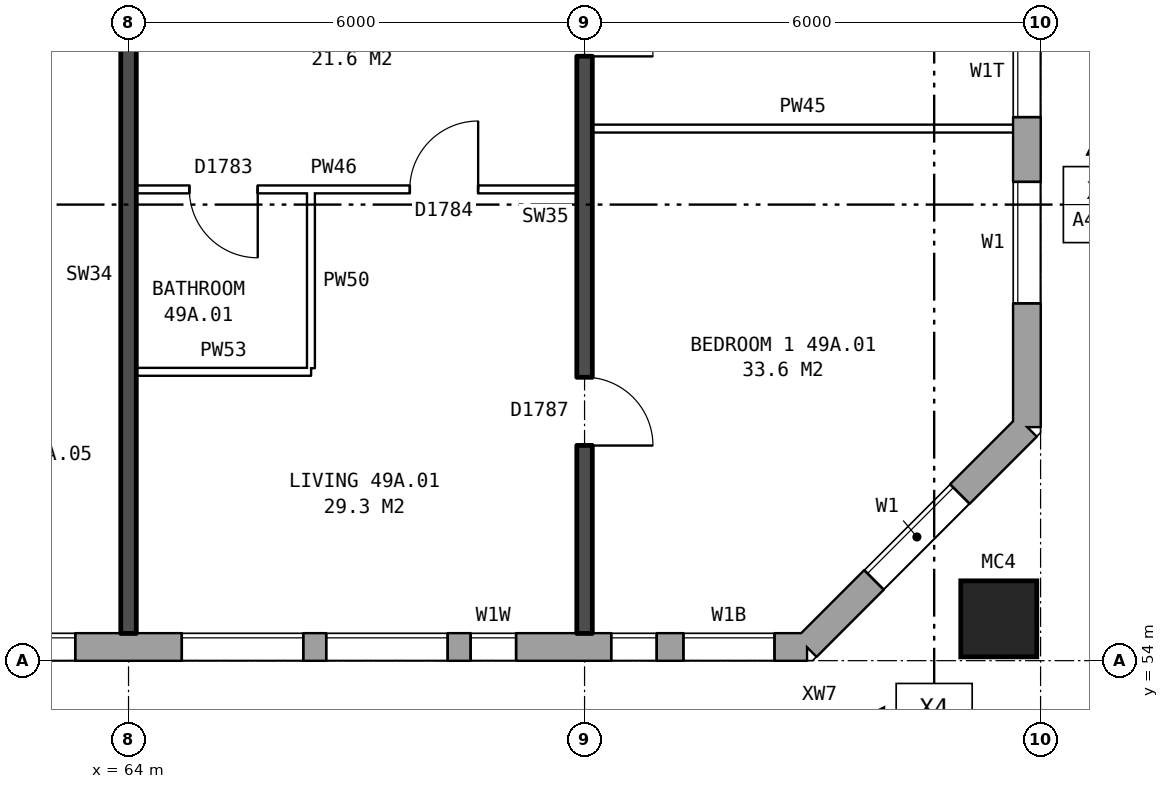
"""IFC4 building model, lengths in metres.
Left out: names, types, materials, properties, quantities, classifications, styles, units other than length and angle.
Written with IfcOpenShell. Run it as: python <this file> out.ifc"""

import sys

from ifc_helpers import new_model, si_unit, direction, frame, frame_2d, origin, origin_2d, place, context, subcontext, project, spatial, rectangle, hollow_rectangle, extrude, element, fill, save


model = new_model("IFC4")
c1 = context("Model", 3, precision=1e-05, world=origin(), true_north=direction((0.0, 1.0)))
c2 = subcontext(c1, "Body", "Model", "MODEL_VIEW")
j1 = project(units=[si_unit("LENGTHUNIT", "METRE"), si_unit("PLANEANGLEUNIT", "RADIAN")], contexts=[c1])
p1 = place(None, origin())
s1 = spatial("IfcSite", under=j1, at=p1, CompositionType="ELEMENT")
p2 = place(p1, origin())
s2 = spatial("IfcBuilding", under=s1, at=p2, CompositionType="ELEMENT")
p3 = place(p2, frame((0.0, 0.0, 175.8)))
s3 = spatial("IfcBuildingStorey", under=s2, at=p3, CompositionType="ELEMENT", Elevation=175.8)
p4 = place(p3, frame((75.45, 54.55, 0.0), z_axis=(0.0, 0.0, 1.0), x_axis=(1.0, 0.0, 0.0)))
e1 = element("IfcColumn", 1, at=p4, inside=s3, PredefinedType="COLUMN", context=c2, shape_type="SweptSolid", body=[
    extrude(hollow_rectangle(XDim=1.0, YDim=1.0, WallThickness=0.055, at=origin_2d()), origin(), (0.0, 0.0, 1.0), 3.1),
])
p5 = place(p3, frame((33.325, 54.18, 0.0), z_axis=(0.0, 0.0, 1.0), x_axis=(1.0, 0.0, 0.0)))
e2 = element("IfcWall", 2, at=p5, inside=s3, PredefinedType="STANDARD", context=c2, shape_type="SweptSolid", body=[
    extrude(rectangle(XDim=39.601, YDim=0.36, at=frame_2d((19.8, 0.0))), origin(), (0.0, 0.0, 1.0), 2.85),
])
p6 = place(p5, frame((0.875, 0.0, 0.8)))
e3 = element("IfcOpeningElement", 3, at=p6, cuts=e2, PredefinedType="OPENING", context=c2, shape_type="SweptSolid", body=[
    extrude(rectangle(XDim=0.6, YDim=1.8, at=frame_2d((0.3, 0.9))), frame((0.0, 0.19, 0.0), z_axis=(0.0, -1.0, 0.0), x_axis=(1.0, 0.0, 0.0)), (0.0, 0.0, 1.0), 0.38),
])
p7 = place(p5, frame((4.375, 0.0, 0.8)))
e4 = element("IfcOpeningElement", 4, at=p7, cuts=e2, PredefinedType="OPENING", context=c2, shape_type="SweptSolid", body=[
    extrude(rectangle(XDim=1.6, YDim=1.8, at=frame_2d((0.8, 0.9))), frame((0.0, 0.19, 0.0), z_axis=(0.0, -1.0, 0.0), x_axis=(1.0, 0.0, 0.0)), (0.0, 0.0, 1.0), 0.38),
])
p8 = place(p5, frame((7.375, 0.0, 0.8)))
e5 = element("IfcOpeningElement", 5, at=p8, cuts=e2, PredefinedType="OPENING", context=c2, shape_type="SweptSolid", body=[
    extrude(rectangle(XDim=1.6, YDim=1.8, at=frame_2d((0.8, 0.9))), frame((0.0, 0.19, 0.0), z_axis=(0.0, -1.0, 0.0), x_axis=(1.0, 0.0, 0.0)), (0.0, 0.0, 1.0), 0.38),
])
p9 = place(p5, frame((10.375, 0.0, 0.8)))
e6 = element("IfcOpeningElement", 6, at=p9, cuts=e2, PredefinedType="OPENING", context=c2, shape_type="SweptSolid", body=[
    extrude(rectangle(XDim=1.6, YDim=1.8, at=frame_2d((0.8, 0.9))), frame((0.0, 0.19, 0.0), z_axis=(0.0, -1.0, 0.0), x_axis=(1.0, 0.0, 0.0)), (0.0, 0.0, 1.0), 0.38),
])
p10 = place(p5, frame((13.375, 0.0, 0.8)))
e7 = element("IfcOpeningElement", 7, at=p10, cuts=e2, PredefinedType="OPENING", context=c2, shape_type="SweptSolid", body=[
    extrude(rectangle(XDim=1.6, YDim=1.8, at=frame_2d((0.8, 0.9))), frame((0.0, 0.19, 0.0), z_axis=(0.0, -1.0, 0.0), x_axis=(1.0, 0.0, 0.0)), (0.0, 0.0, 1.0), 0.38),
])
p11 = place(p5, frame((16.375, 0.0, 0.8)))
e8 = element("IfcOpeningElement", 8, at=p11, cuts=e2, PredefinedType="OPENING", context=c2, shape_type="SweptSolid", body=[
    extrude(rectangle(XDim=1.6, YDim=1.8, at=frame_2d((0.8, 0.9))), frame((0.0, 0.19, 0.0), z_axis=(0.0, -1.0, 0.0), x_axis=(1.0, 0.0, 0.0)), (0.0, 0.0, 1.0), 0.38),
])
p12 = place(p5, frame((19.375, 0.0, 0.8)))
e9 = element("IfcOpeningElement", 9, at=p12, cuts=e2, PredefinedType="OPENING", context=c2, shape_type="SweptSolid", body=[
    extrude(rectangle(XDim=1.6, YDim=1.8, at=frame_2d((0.8, 0.9))), frame((0.0, 0.19, 0.0), z_axis=(0.0, -1.0, 0.0), x_axis=(1.0, 0.0, 0.0)), (0.0, 0.0, 1.0), 0.38),
])
p13 = place(p5, frame((22.375, 0.0, 0.8)))
e10 = element("IfcOpeningElement", 10, at=p13, cuts=e2, PredefinedType="OPENING", context=c2, shape_type="SweptSolid", body=[
    extrude(rectangle(XDim=1.6, YDim=1.8, at=frame_2d((0.8, 0.9))), frame((0.0, 0.19, 0.0), z_axis=(0.0, -1.0, 0.0), x_axis=(1.0, 0.0, 0.0)), (0.0, 0.0, 1.0), 0.38),
])
p14 = place(p5, frame((25.375, 0.0, 0.8)))
e11 = element("IfcOpeningElement", 11, at=p14, cuts=e2, PredefinedType="OPENING", context=c2, shape_type="SweptSolid", body=[
    extrude(rectangle(XDim=1.6, YDim=1.8, at=frame_2d((0.8, 0.9))), frame((0.0, 0.19, 0.0), z_axis=(0.0, -1.0, 0.0), x_axis=(1.0, 0.0, 0.0)), (0.0, 0.0, 1.0), 0.38),
])
p15 = place(p5, frame((28.375, 0.0, 0.8)))
e12 = element("IfcOpeningElement", 12, at=p15, cuts=e2, PredefinedType="OPENING", context=c2, shape_type="SweptSolid", body=[
    extrude(rectangle(XDim=1.6, YDim=1.8, at=frame_2d((0.8, 0.9))), frame((0.0, 0.19, 0.0), z_axis=(0.0, -1.0, 0.0), x_axis=(1.0, 0.0, 0.0)), (0.0, 0.0, 1.0), 0.38),
])
p16 = place(p5, frame((31.375, 0.0, 0.8)))
e13 = element("IfcOpeningElement", 13, at=p16, cuts=e2, PredefinedType="OPENING", context=c2, shape_type="SweptSolid", body=[
    extrude(rectangle(XDim=1.6, YDim=1.8, at=frame_2d((0.8, 0.9))), frame((0.0, 0.19, 0.0), z_axis=(0.0, -1.0, 0.0), x_axis=(1.0, 0.0, 0.0)), (0.0, 0.0, 1.0), 0.38),
])
p17 = place(p5, frame((33.275, 0.0, 0.8)))
e14 = element("IfcOpeningElement", 14, at=p17, cuts=e2, PredefinedType="OPENING", context=c2, shape_type="SweptSolid", body=[
    extrude(rectangle(XDim=1.6, YDim=1.8, at=frame_2d((0.8, 0.9))), frame((0.0, 0.19, 0.0), z_axis=(0.0, -1.0, 0.0), x_axis=(1.0, 0.0, 0.0)), (0.0, 0.0, 1.0), 0.38),
])
p18 = place(p5, frame((37.025, 0.0, 1.7)))
e15 = element("IfcOpeningElement", 15, at=p18, cuts=e2, PredefinedType="OPENING", context=c2, shape_type="SweptSolid", body=[
    extrude(rectangle(XDim=0.6, YDim=0.9, at=frame_2d((0.3, 0.45))), frame((0.0, 0.19, 0.0), z_axis=(0.0, -1.0, 0.0), x_axis=(1.0, 0.0, 0.0)), (0.0, 0.0, 1.0), 0.38),
])
p19 = place(p5, frame((1.775, 0.0, 1.7)))
e16 = element("IfcOpeningElement", 16, at=p19, cuts=e2, PredefinedType="OPENING", context=c2, shape_type="SweptSolid", body=[
    extrude(rectangle(XDim=0.8, YDim=0.9, at=frame_2d((0.4, 0.45))), frame((0.0, 0.19, 0.0), z_axis=(0.0, -1.0, 0.0), x_axis=(1.0, 0.0, 0.0)), (0.0, 0.0, 1.0), 0.38),
])
p20 = place(p5, frame((35.175, 0.0, 0.8)))
e17 = element("IfcOpeningElement", 17, at=p20, cuts=e2, PredefinedType="OPENING", context=c2, shape_type="SweptSolid", body=[
    extrude(rectangle(XDim=0.6, YDim=0.9, at=frame_2d((0.3, 0.45))), frame((0.0, 0.19, 0.0), z_axis=(0.0, -1.0, 0.0), x_axis=(1.0, 0.0, 0.0)), (0.0, 0.0, 1.0), 0.38),
])
p21 = place(p5, frame((37.975, 0.0, 0.8)))
e18 = element("IfcOpeningElement", 18, at=p21, cuts=e2, PredefinedType="OPENING", context=c2, shape_type="SweptSolid", body=[
    extrude(rectangle(XDim=1.2, YDim=1.8, at=frame_2d((0.6, 0.9))), frame((0.0, 0.19, 0.0), z_axis=(0.0, -1.0, 0.0), x_axis=(1.0, 0.0, 0.0)), (0.0, 0.0, 1.0), 0.38),
])
p22 = place(p3, frame((72.925, 54.18, 0.0), z_axis=(0.0, 0.0, 1.0), x_axis=(0.707106781187, 0.707106781187, 0.0)))
e19 = element("IfcWall", 19, at=p22, inside=s3, PredefinedType="STANDARD", context=c2, shape_type="SweptSolid", body=[
    extrude(rectangle(XDim=4.094, YDim=0.36, at=frame_2d((2.047, 0.0))), origin(), (0.0, 0.0, 1.0), 2.85),
])
p23 = place(p22, frame((1.247, 0.0, 0.8)))
e20 = element("IfcOpeningElement", 20, at=p23, cuts=e19, PredefinedType="OPENING", context=c2, shape_type="SweptSolid", body=[
    extrude(rectangle(XDim=1.6, YDim=1.8, at=frame_2d((0.8, 0.9))), frame((0.0, 0.19, 0.0), z_axis=(0.0, -1.0, 0.0), x_axis=(1.0, 0.0, 0.0)), (0.0, 0.0, 1.0), 0.38),
])
p24 = place(p3, frame((75.82, 57.075, 0.0), z_axis=(0.0, 0.0, 1.0), x_axis=(0.0, 1.0, 0.0)))
e21 = element("IfcWall", 21, at=p24, inside=s3, PredefinedType="STANDARD", context=c2, shape_type="SweptSolid", body=[
    extrude(rectangle(XDim=25.851, YDim=0.36, at=frame_2d((12.925, 0.0))), origin(), (0.0, 0.0, 1.0), 2.85),
])
p25 = place(p24, frame((1.625, 0.0, 0.8)))
e22 = element("IfcOpeningElement", 22, at=p25, cuts=e21, PredefinedType="OPENING", context=c2, shape_type="SweptSolid", body=[
    extrude(rectangle(XDim=1.6, YDim=1.8, at=frame_2d((0.8, 0.9))), frame((0.0, 0.19, 0.0), z_axis=(0.0, -1.0, 0.0), x_axis=(1.0, 0.0, 0.0)), (0.0, 0.0, 1.0), 0.38),
])
p26 = place(p24, frame((4.075, 0.0, 1.65)))
e23 = element("IfcOpeningElement", 23, at=p26, cuts=e21, PredefinedType="OPENING", context=c2, shape_type="SweptSolid", body=[
    extrude(rectangle(XDim=1.2, YDim=0.9, at=frame_2d((0.6, 0.45))), frame((0.0, 0.19, 0.0), z_axis=(0.0, -1.0, 0.0), x_axis=(1.0, 0.0, 0.0)), (0.0, 0.0, 1.0), 0.38),
])
p27 = place(p24, frame((19.45, 0.0, 0.35)))
e24 = element("IfcOpeningElement", 24, at=p27, cuts=e21, PredefinedType="OPENING", context=c2, shape_type="SweptSolid", body=[
    extrude(rectangle(XDim=0.8, YDim=0.9, at=frame_2d((0.4, 0.45))), frame((0.0, 0.19, 0.0), z_axis=(0.0, -1.0, 0.0), x_axis=(1.0, 0.0, 0.0)), (0.0, 0.0, 1.0), 0.38),
])
p28 = place(p24, frame((22.625, 0.0, 0.8)))
e25 = element("IfcOpeningElement", 25, at=p28, cuts=e21, PredefinedType="OPENING", context=c2, shape_type="SweptSolid", body=[
    extrude(rectangle(XDim=1.6, YDim=1.8, at=frame_2d((0.8, 0.9))), frame((0.0, 0.19, 0.0), z_axis=(0.0, -1.0, 0.0), x_axis=(1.0, 0.0, 0.0)), (0.0, 0.0, 1.0), 0.38),
])
p29 = place(p24, frame((5.775, 0.0, 0.45)))
e26 = element("IfcOpeningElement", 26, at=p29, cuts=e21, PredefinedType="OPENING", context=c2, shape_type="SweptSolid", body=[
    extrude(rectangle(XDim=0.6, YDim=0.9, at=frame_2d((0.3, 0.45))), frame((0.0, 0.19, 0.0), z_axis=(0.0, -1.0, 0.0), x_axis=(1.0, 0.0, 0.0)), (0.0, 0.0, 1.0), 0.38),
])
p30 = place(p24, frame((20.6, 0.0, 1.65)))
e27 = element("IfcOpeningElement", 27, at=p30, cuts=e21, PredefinedType="OPENING", context=c2, shape_type="SweptSolid", body=[
    extrude(rectangle(XDim=1.0, YDim=0.9, at=frame_2d((0.5, 0.45))), frame((0.0, 0.19, 0.0), z_axis=(0.0, -1.0, 0.0), x_axis=(1.0, 0.0, 0.0)), (0.0, 0.0, 1.0), 0.38),
])
p31 = place(p3, frame((64.1, 57.8, 0.0), z_axis=(0.0, 0.0, 1.0), x_axis=(1.0, 0.0, 0.0)))
e28 = element("IfcWall", 28, at=p31, inside=s3, PredefinedType="PARTITIONING", context=c2, shape_type="SweptSolid", body=[
    extrude(rectangle(XDim=2.3, YDim=0.1, at=frame_2d((1.15, 0.0))), origin(), (0.0, 0.0, 1.0), 2.85),
])
p32 = place(p3, frame((64.1, 60.2, 0.0), z_axis=(0.0, 0.0, 1.0), x_axis=(1.0, 0.0, 0.0)))
e29 = element("IfcWall", 29, at=p32, inside=s3, PredefinedType="PARTITIONING", context=c2, shape_type="SweptSolid", body=[
    extrude(rectangle(XDim=5.8, YDim=0.1, at=frame_2d((2.9, 0.0))), origin(), (0.0, 0.0, 1.0), 2.85),
])
p33 = place(p32, frame((3.6, 0.0, 0.0)))
e30 = element("IfcOpeningElement", 30, at=p33, cuts=e29, PredefinedType="OPENING", context=c2, shape_type="SweptSolid", body=[
    extrude(rectangle(XDim=0.9, YDim=2.1, at=frame_2d((0.45, 1.05))), frame((0.0, 0.06, 0.0), z_axis=(0.0, -1.0, 0.0), x_axis=(1.0, 0.0, 0.0)), (0.0, 0.0, 1.0), 0.12),
])
p34 = place(p32, frame((0.7, 0.0, 0.0)))
e31 = element("IfcOpeningElement", 31, at=p34, cuts=e29, PredefinedType="OPENING", context=c2, shape_type="SweptSolid", body=[
    extrude(rectangle(XDim=0.9, YDim=2.1, at=frame_2d((0.45, 1.05))), frame((0.0, 0.06, 0.0), z_axis=(0.0, -1.0, 0.0), x_axis=(1.0, 0.0, 0.0)), (0.0, 0.0, 1.0), 0.12),
])
p35 = place(p3, frame((70.1, 61.0, 0.0), z_axis=(0.0, 0.0, 1.0), x_axis=(1.0, 0.0, 0.0)))
e32 = element("IfcWall", 32, at=p35, inside=s3, PredefinedType="PARTITIONING", context=c2, shape_type="SweptSolid", body=[
    extrude(rectangle(XDim=5.54, YDim=0.1, at=frame_2d((2.77, 0.0))), origin(), (0.0, 0.0, 1.0), 2.85),
])
p36 = place(p3, frame((64.0, 54.36, 0.0), z_axis=(0.0, 0.0, 1.0), x_axis=(0.0, 1.0, 0.0)))
e33 = element("IfcWall", 33, at=p36, inside=s3, PredefinedType="SOLIDWALL", context=c2, shape_type="SweptSolid", body=[
    extrude(rectangle(XDim=9.44, YDim=0.2, at=frame_2d((4.72, 0.0))), origin(), (0.0, 0.0, 1.0), 2.85),
])
p37 = place(p3, frame((66.4, 57.85, 0.0), z_axis=(0.0, 0.0, 1.0), x_axis=(0.0, 1.0, 0.0)))
e34 = element("IfcWall", 34, at=p37, inside=s3, PredefinedType="PARTITIONING", context=c2, shape_type="SweptSolid", body=[
    extrude(rectangle(XDim=2.3, YDim=0.1, at=frame_2d((1.15, 0.0))), origin(), (0.0, 0.0, 1.0), 2.85),
])
p38 = place(p3, frame((70.0, 54.36, 0.0), z_axis=(0.0, 0.0, 1.0), x_axis=(0.0, 1.0, 0.0)))
e35 = element("IfcWall", 35, at=p38, inside=s3, PredefinedType="SOLIDWALL", context=c2, shape_type="SweptSolid", body=[
    extrude(rectangle(XDim=9.44, YDim=0.2, at=frame_2d((4.72, 0.0))), origin(), (0.0, 0.0, 1.0), 2.85),
])
p39 = place(p38, frame((2.47, 0.0, 0.0)))
e36 = element("IfcOpeningElement", 36, at=p39, cuts=e35, PredefinedType="OPENING", context=c2, shape_type="SweptSolid", body=[
    extrude(rectangle(XDim=0.9, YDim=2.1, at=frame_2d((0.45, 1.05))), frame((0.0, 0.11, 0.0), z_axis=(0.0, -1.0, 0.0), x_axis=(1.0, 0.0, 0.0)), (0.0, 0.0, 1.0), 0.22),
])
p40 = place(p38, frame((7.59, 0.0, 0.0)))
e37 = element("IfcOpeningElement", 37, at=p40, cuts=e35, PredefinedType="OPENING", context=c2, shape_type="SweptSolid", body=[
    extrude(rectangle(XDim=0.9, YDim=2.1, at=frame_2d((0.45, 1.05))), frame((0.0, 0.11, 0.0), z_axis=(0.0, -1.0, 0.0), x_axis=(1.0, 0.0, 0.0)), (0.0, 0.0, 1.0), 0.22),
])
p41 = place(p15, origin())
e38 = element("IfcWindow", 38, at=p41, inside=s3, PartitioningType="SINGLE_PANEL", PredefinedType="WINDOW", context=c2, shape_type="SweptSolid", body=[
    extrude(rectangle(XDim=1.6, YDim=1.8, at=frame_2d((0.8, 0.9))), frame((0.0, 0.15, 0.0), z_axis=(0.0, -1.0, 0.0), x_axis=(1.0, 0.0, 0.0)), (0.0, 0.0, 1.0), 0.06),
])
fill(e12, e38)
p42 = place(p16, origin())
e39 = element("IfcWindow", 39, at=p42, inside=s3, PartitioningType="SINGLE_PANEL", PredefinedType="WINDOW", context=c2, shape_type="SweptSolid", body=[
    extrude(rectangle(XDim=1.6, YDim=1.8, at=frame_2d((0.8, 0.9))), frame((0.0, 0.15, 0.0), z_axis=(0.0, -1.0, 0.0), x_axis=(1.0, 0.0, 0.0)), (0.0, 0.0, 1.0), 0.06),
])
fill(e13, e39)
p43 = place(p17, origin())
e40 = element("IfcWindow", 40, at=p43, inside=s3, PartitioningType="SINGLE_PANEL", PredefinedType="WINDOW", context=c2, shape_type="SweptSolid", body=[
    extrude(rectangle(XDim=1.6, YDim=1.8, at=frame_2d((0.8, 0.9))), frame((0.0, 0.15, 0.0), z_axis=(0.0, -1.0, 0.0), x_axis=(1.0, 0.0, 0.0)), (0.0, 0.0, 1.0), 0.06),
])
fill(e14, e40)
p44 = place(p18, origin())
e41 = element("IfcWindow", 41, at=p44, inside=s3, PartitioningType="SINGLE_PANEL", PredefinedType="WINDOW", context=c2, shape_type="SweptSolid", body=[
    extrude(rectangle(XDim=0.6, YDim=0.9, at=frame_2d((0.3, 0.45))), frame((0.0, 0.15, 0.0), z_axis=(0.0, -1.0, 0.0), x_axis=(1.0, 0.0, 0.0)), (0.0, 0.0, 1.0), 0.06),
])
fill(e15, e41)
p45 = place(p23, origin())
e42 = element("IfcWindow", 42, at=p45, inside=s3, PartitioningType="SINGLE_PANEL", PredefinedType="WINDOW", context=c2, shape_type="SweptSolid", body=[
    extrude(rectangle(XDim=1.6, YDim=1.8, at=frame_2d((0.8, 0.9))), frame((0.0, 0.15, 0.0), z_axis=(0.0, -1.0, 0.0), x_axis=(1.0, 0.0, 0.0)), (0.0, 0.0, 1.0), 0.06),
])
fill(e20, e42)
p46 = place(p25, origin())
e43 = element("IfcWindow", 43, at=p46, inside=s3, PartitioningType="SINGLE_PANEL", PredefinedType="WINDOW", context=c2, shape_type="SweptSolid", body=[
    extrude(rectangle(XDim=1.6, YDim=1.8, at=frame_2d((0.8, 0.9))), frame((0.0, 0.15, 0.0), z_axis=(0.0, -1.0, 0.0), x_axis=(1.0, 0.0, 0.0)), (0.0, 0.0, 1.0), 0.06),
])
fill(e22, e43)
p47 = place(p26, origin())
e44 = element("IfcWindow", 44, at=p47, inside=s3, PartitioningType="SINGLE_PANEL", PredefinedType="WINDOW", context=c2, shape_type="SweptSolid", body=[
    extrude(rectangle(XDim=1.2, YDim=0.9, at=frame_2d((0.6, 0.45))), frame((0.0, 0.15, 0.0), z_axis=(0.0, -1.0, 0.0), x_axis=(1.0, 0.0, 0.0)), (0.0, 0.0, 1.0), 0.06),
])
fill(e23, e44)
p48 = place(p39, frame((0.9, 0.0, 0.0), z_axis=(0.0, 0.0, 1.0), x_axis=(-1.0, 0.0, 0.0)))
e45 = element("IfcDoor", 45, at=p48, inside=s3, OperationType="SINGLE_SWING_RIGHT", PredefinedType="DOOR", context=c2, shape_type="SweptSolid", body=[
    extrude(rectangle(XDim=0.9, YDim=2.1, at=frame_2d((0.45, 1.05))), frame((0.0, 0.025, 0.0), z_axis=(0.0, -1.0, 0.0), x_axis=(1.0, 0.0, 0.0)), (0.0, 0.0, 1.0), 0.05),
])
fill(e36, e45)
p49 = place(p40, frame((0.9, 0.0, 0.0), z_axis=(0.0, 0.0, 1.0), x_axis=(-1.0, 0.0, 0.0)))
e46 = element("IfcDoor", 46, at=p49, inside=s3, OperationType="SINGLE_SWING_RIGHT", PredefinedType="DOOR", context=c2, shape_type="SweptSolid", body=[
    extrude(rectangle(XDim=0.9, YDim=2.1, at=frame_2d((0.45, 1.05))), frame((0.0, 0.025, 0.0), z_axis=(0.0, -1.0, 0.0), x_axis=(1.0, 0.0, 0.0)), (0.0, 0.0, 1.0), 0.05),
])
fill(e37, e46)
p50 = place(p33, origin())
e47 = element("IfcDoor", 47, at=p50, inside=s3, OperationType="SINGLE_SWING_RIGHT", PredefinedType="DOOR", context=c2, shape_type="SweptSolid", body=[
    extrude(rectangle(XDim=0.9, YDim=2.1, at=frame_2d((0.45, 1.05))), frame((0.0, 0.025, 0.0), z_axis=(0.0, -1.0, 0.0), x_axis=(1.0, 0.0, 0.0)), (0.0, 0.0, 1.0), 0.05),
])
fill(e30, e47)
p51 = place(p34, frame((0.9, 0.0, 0.0), z_axis=(0.0, 0.0, 1.0), x_axis=(-1.0, 0.0, 0.0)))
e48 = element("IfcDoor", 48, at=p51, inside=s3, OperationType="SINGLE_SWING_LEFT", PredefinedType="DOOR", context=c2, shape_type="SweptSolid", body=[
    extrude(rectangle(XDim=0.9, YDim=2.1, at=frame_2d((0.45, 1.05))), frame((0.0, 0.025, 0.0), z_axis=(0.0, -1.0, 0.0), x_axis=(1.0, 0.0, 0.0)), (0.0, 0.0, 1.0), 0.05),
])
fill(e31, e48)
p52 = place(p20, origin())
e49 = element("IfcWindow", 49, at=p52, inside=s3, PartitioningType="SINGLE_PANEL", PredefinedType="WINDOW", context=c2, shape_type="SweptSolid", body=[
    extrude(rectangle(XDim=0.6, YDim=0.9, at=frame_2d((0.3, 0.45))), frame((0.0, 0.15, 0.0), z_axis=(0.0, -1.0, 0.0), x_axis=(1.0, 0.0, 0.0)), (0.0, 0.0, 1.0), 0.06),
])
fill(e17, e49)
p53 = place(p21, origin())
e50 = element("IfcWindow", 50, at=p53, inside=s3, PartitioningType="SINGLE_PANEL", PredefinedType="WINDOW", context=c2, shape_type="SweptSolid", body=[
    extrude(rectangle(XDim=1.2, YDim=1.8, at=frame_2d((0.6, 0.9))), frame((0.0, 0.15, 0.0), z_axis=(0.0, -1.0, 0.0), x_axis=(1.0, 0.0, 0.0)), (0.0, 0.0, 1.0), 0.06),
])
fill(e18, e50)
save(model, sys.argv[1])
